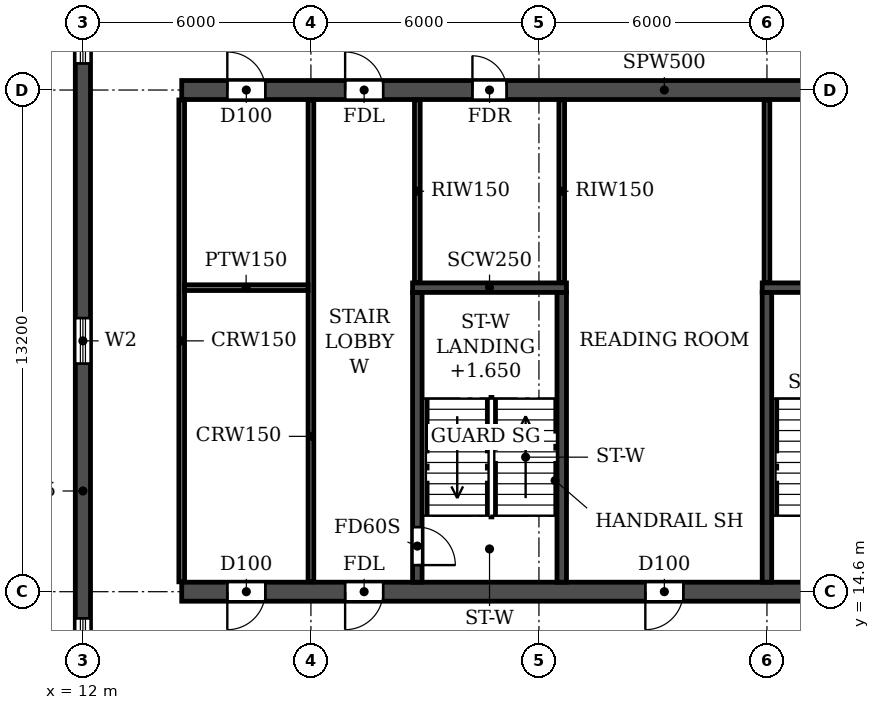
"""IFC4 building model, lengths in metres.
Left out: names, types, materials, properties, quantities, classifications, styles, units other than length and angle.
Written with IfcOpenShell. Run it as: python <this file> out.ifc"""

import sys

from ifc_helpers import new_model, si_unit, direction, frame, frame_2d, origin, place, context, subcontext, project, spatial, rectangle, extrude, element, fill, save


model = new_model("IFC4")
c1 = context("Model", 3, precision=1e-05, world=origin(), true_north=direction((0.0, 1.0)))
c2 = subcontext(c1, "Body", "Model", "MODEL_VIEW")
j1 = project(units=[si_unit("LENGTHUNIT", "METRE"), si_unit("PLANEANGLEUNIT", "RADIAN")], contexts=[c1])
p1 = place(None, origin())
s1 = spatial("IfcSite", under=j1, at=p1, CompositionType="ELEMENT")
p2 = place(p1, origin())
s2 = spatial("IfcBuilding", under=s1, at=p2, CompositionType="ELEMENT")
p3 = place(p2, frame((0.0, 0.0, 112.5)))
s3 = spatial("IfcBuildingStorey", under=s2, at=p3, CompositionType="ELEMENT", Elevation=112.5)
p4 = place(p3, frame((12.0, 4.683, 0.0), z_axis=(0.0, 0.0, 1.0), x_axis=(0.0, 1.0, 0.0)))
e1 = element("IfcWall", 1, at=p4, inside=s3, PredefinedType="SHEAR", context=c2, shape_type="SweptSolid", body=[
    extrude(rectangle(XDim=34.234, YDim=0.4, at=frame_2d((17.117, 0.0))), origin(), (0.0, 0.0, 1.0), 2.95),
])
p5 = place(p4, frame((23.817, 0.0, 0.9)))
e2 = element("IfcOpeningElement", 2, at=p5, cuts=e1, PredefinedType="OPENING", context=c2, shape_type="SweptSolid", body=[
    extrude(rectangle(XDim=1.2, YDim=1.5, at=frame_2d((0.6, 0.75))), frame((0.0, 0.21, 0.0), z_axis=(0.0, -1.0, 0.0), x_axis=(1.0, 0.0, 0.0)), (0.0, 0.0, 1.0), 0.42),
])
p6 = place(p4, frame((8.017, 0.0, 0.9)))
e3 = element("IfcOpeningElement", 3, at=p6, cuts=e1, PredefinedType="OPENING", context=c2, shape_type="SweptSolid", body=[
    extrude(rectangle(XDim=1.2, YDim=1.5, at=frame_2d((0.6, 0.75))), frame((0.0, 0.21, 0.0), z_axis=(0.0, -1.0, 0.0), x_axis=(1.0, 0.0, 0.0)), (0.0, 0.0, 1.0), 0.42),
])
p7 = place(p4, frame((15.917, 0.0, 0.9)))
e4 = element("IfcOpeningElement", 4, at=p7, cuts=e1, PredefinedType="OPENING", context=c2, shape_type="SweptSolid", body=[
    extrude(rectangle(XDim=1.2, YDim=1.5, at=frame_2d((0.6, 0.75))), frame((0.0, 0.21, 0.0), z_axis=(0.0, -1.0, 0.0), x_axis=(1.0, 0.0, 0.0)), (0.0, 0.0, 1.0), 0.42),
])
p8 = place(p4, frame((28.894, 0.0, 0.6)))
e5 = element("IfcOpeningElement", 5, at=p8, cuts=e1, PredefinedType="OPENING", context=c2, shape_type="SweptSolid", body=[
    extrude(rectangle(XDim=2.2, YDim=1.8, at=frame_2d((1.1, 0.9))), frame((0.0, 0.21, 0.0), z_axis=(0.0, -1.0, 0.0), x_axis=(1.0, 0.0, 0.0)), (0.0, 0.0, 1.0), 0.42),
])
p9 = place(p4, frame((2.541, 0.0, 0.6)))
e6 = element("IfcOpeningElement", 6, at=p9, cuts=e1, PredefinedType="OPENING", context=c2, shape_type="SweptSolid", body=[
    extrude(rectangle(XDim=2.2, YDim=1.8, at=frame_2d((1.1, 0.9))), frame((0.0, 0.21, 0.0), z_axis=(0.0, -1.0, 0.0), x_axis=(1.0, 0.0, 0.0)), (0.0, 0.0, 1.0), 0.42),
])
p10 = place(p3, frame((14.6, 14.6, 0.0), z_axis=(0.0, 0.0, 1.0), x_axis=(1.0, 0.0, 0.0)))
e7 = element("IfcWall", 7, at=p10, inside=s3, PredefinedType="SOLIDWALL", context=c2, shape_type="SweptSolid", body=[
    extrude(rectangle(XDim=72.8, YDim=0.5, at=frame_2d((36.4, 0.0))), origin(), (0.0, 0.0, 1.0), 2.95),
])
p11 = place(p10, frame((1.2, 0.0, 0.0)))
e8 = element("IfcOpeningElement", 8, at=p11, cuts=e7, PredefinedType="OPENING", context=c2, shape_type="SweptSolid", body=[
    extrude(rectangle(XDim=1.0, YDim=2.1, at=frame_2d((0.5, 1.05))), frame((0.0, 0.26, 0.0), z_axis=(0.0, -1.0, 0.0), x_axis=(1.0, 0.0, 0.0)), (0.0, 0.0, 1.0), 0.52),
])
p12 = place(p10, frame((4.3, 0.0, 0.0)))
e9 = element("IfcOpeningElement", 9, at=p12, cuts=e7, PredefinedType="OPENING", context=c2, shape_type="SweptSolid", body=[
    extrude(rectangle(XDim=1.0, YDim=2.1, at=frame_2d((0.5, 1.05))), frame((0.0, 0.26, 0.0), z_axis=(0.0, -1.0, 0.0), x_axis=(1.0, 0.0, 0.0)), (0.0, 0.0, 1.0), 0.52),
])
p13 = place(p10, frame((12.2, 0.0, 0.0)))
e10 = element("IfcOpeningElement", 10, at=p13, cuts=e7, PredefinedType="OPENING", context=c2, shape_type="SweptSolid", body=[
    extrude(rectangle(XDim=1.0, YDim=2.1, at=frame_2d((0.5, 1.05))), frame((0.0, 0.26, 0.0), z_axis=(0.0, -1.0, 0.0), x_axis=(1.0, 0.0, 0.0)), (0.0, 0.0, 1.0), 0.52),
])
p14 = place(p10, frame((16.8, 0.0, 0.0)))
e11 = element("IfcOpeningElement", 11, at=p14, cuts=e7, PredefinedType="OPENING", context=c2, shape_type="SweptSolid", body=[
    extrude(rectangle(XDim=1.0, YDim=2.1, at=frame_2d((0.5, 1.05))), frame((0.0, 0.26, 0.0), z_axis=(0.0, -1.0, 0.0), x_axis=(1.0, 0.0, 0.0)), (0.0, 0.0, 1.0), 0.52),
])
p15 = place(p10, frame((28.1, 0.0, 0.0)))
e12 = element("IfcOpeningElement", 12, at=p15, cuts=e7, PredefinedType="OPENING", context=c2, shape_type="SweptSolid", body=[
    extrude(rectangle(XDim=1.0, YDim=2.1, at=frame_2d((0.5, 1.05))), frame((0.0, 0.26, 0.0), z_axis=(0.0, -1.0, 0.0), x_axis=(1.0, 0.0, 0.0)), (0.0, 0.0, 1.0), 0.52),
])
p16 = place(p10, frame((32.0, 0.0, 0.0)))
e13 = element("IfcOpeningElement", 13, at=p16, cuts=e7, PredefinedType="OPENING", context=c2, shape_type="SweptSolid", body=[
    extrude(rectangle(XDim=1.0, YDim=2.1, at=frame_2d((0.5, 1.05))), frame((0.0, 0.26, 0.0), z_axis=(0.0, -1.0, 0.0), x_axis=(1.0, 0.0, 0.0)), (0.0, 0.0, 1.0), 0.52),
])
p17 = place(p10, frame((35.9, 0.0, 0.0)))
e14 = element("IfcOpeningElement", 14, at=p17, cuts=e7, PredefinedType="OPENING", context=c2, shape_type="SweptSolid", body=[
    extrude(rectangle(XDim=1.0, YDim=2.1, at=frame_2d((0.5, 1.05))), frame((0.0, 0.26, 0.0), z_axis=(0.0, -1.0, 0.0), x_axis=(1.0, 0.0, 0.0)), (0.0, 0.0, 1.0), 0.52),
])
p18 = place(p10, frame((39.8, 0.0, 0.0)))
e15 = element("IfcOpeningElement", 15, at=p18, cuts=e7, PredefinedType="OPENING", context=c2, shape_type="SweptSolid", body=[
    extrude(rectangle(XDim=1.0, YDim=2.1, at=frame_2d((0.5, 1.05))), frame((0.0, 0.26, 0.0), z_axis=(0.0, -1.0, 0.0), x_axis=(1.0, 0.0, 0.0)), (0.0, 0.0, 1.0), 0.52),
])
p19 = place(p10, frame((43.7, 0.0, 0.0)))
e16 = element("IfcOpeningElement", 16, at=p19, cuts=e7, PredefinedType="OPENING", context=c2, shape_type="SweptSolid", body=[
    extrude(rectangle(XDim=1.0, YDim=2.1, at=frame_2d((0.5, 1.05))), frame((0.0, 0.26, 0.0), z_axis=(0.0, -1.0, 0.0), x_axis=(1.0, 0.0, 0.0)), (0.0, 0.0, 1.0), 0.52),
])
p20 = place(p10, frame((55.0, 0.0, 0.0)))
e17 = element("IfcOpeningElement", 17, at=p20, cuts=e7, PredefinedType="OPENING", context=c2, shape_type="SweptSolid", body=[
    extrude(rectangle(XDim=1.0, YDim=2.1, at=frame_2d((0.5, 1.05))), frame((0.0, 0.26, 0.0), z_axis=(0.0, -1.0, 0.0), x_axis=(1.0, 0.0, 0.0)), (0.0, 0.0, 1.0), 0.52),
])
p21 = place(p10, frame((59.6, 0.0, 0.0)))
e18 = element("IfcOpeningElement", 18, at=p21, cuts=e7, PredefinedType="OPENING", context=c2, shape_type="SweptSolid", body=[
    extrude(rectangle(XDim=1.0, YDim=2.1, at=frame_2d((0.5, 1.05))), frame((0.0, 0.26, 0.0), z_axis=(0.0, -1.0, 0.0), x_axis=(1.0, 0.0, 0.0)), (0.0, 0.0, 1.0), 0.52),
])
p22 = place(p10, frame((67.5, 0.0, 0.0)))
e19 = element("IfcOpeningElement", 19, at=p22, cuts=e7, PredefinedType="OPENING", context=c2, shape_type="SweptSolid", body=[
    extrude(rectangle(XDim=1.0, YDim=2.1, at=frame_2d((0.5, 1.05))), frame((0.0, 0.26, 0.0), z_axis=(0.0, -1.0, 0.0), x_axis=(1.0, 0.0, 0.0)), (0.0, 0.0, 1.0), 0.52),
])
p23 = place(p10, frame((70.35, 0.0, 0.0)))
e20 = element("IfcOpeningElement", 20, at=p23, cuts=e7, PredefinedType="OPENING", context=c2, shape_type="SweptSolid", body=[
    extrude(rectangle(XDim=1.5, YDim=2.1, at=frame_2d((0.75, 1.05))), frame((0.0, 0.26, 0.0), z_axis=(0.0, -1.0, 0.0), x_axis=(1.0, 0.0, 0.0)), (0.0, 0.0, 1.0), 0.52),
])
p24 = place(p3, frame((14.6, 27.8, 0.0), z_axis=(0.0, 0.0, 1.0), x_axis=(1.0, 0.0, 0.0)))
e21 = element("IfcWall", 21, at=p24, inside=s3, PredefinedType="SOLIDWALL", context=c2, shape_type="SweptSolid", body=[
    extrude(rectangle(XDim=72.8, YDim=0.5, at=frame_2d((36.4, 0.0))), origin(), (0.0, 0.0, 1.0), 2.95),
])
p25 = place(p24, frame((1.2, 0.0, 0.0)))
e22 = element("IfcOpeningElement", 22, at=p25, cuts=e21, PredefinedType="OPENING", context=c2, shape_type="SweptSolid", body=[
    extrude(rectangle(XDim=1.0, YDim=2.1, at=frame_2d((0.5, 1.05))), frame((0.0, 0.26, 0.0), z_axis=(0.0, -1.0, 0.0), x_axis=(1.0, 0.0, 0.0)), (0.0, 0.0, 1.0), 0.52),
])
p26 = place(p24, frame((4.3, 0.0, 0.0)))
e23 = element("IfcOpeningElement", 23, at=p26, cuts=e21, PredefinedType="OPENING", context=c2, shape_type="SweptSolid", body=[
    extrude(rectangle(XDim=1.0, YDim=2.1, at=frame_2d((0.5, 1.05))), frame((0.0, 0.26, 0.0), z_axis=(0.0, -1.0, 0.0), x_axis=(1.0, 0.0, 0.0)), (0.0, 0.0, 1.0), 0.52),
])
p27 = place(p24, frame((7.65, 0.0, 0.0)))
e24 = element("IfcOpeningElement", 24, at=p27, cuts=e21, PredefinedType="OPENING", context=c2, shape_type="SweptSolid", body=[
    extrude(rectangle(XDim=0.9, YDim=2.1, at=frame_2d((0.45, 1.05))), frame((0.0, 0.26, 0.0), z_axis=(0.0, -1.0, 0.0), x_axis=(1.0, 0.0, 0.0)), (0.0, 0.0, 1.0), 0.52),
])
p28 = place(p24, frame((16.85, 0.0, 0.0)))
e25 = element("IfcOpeningElement", 25, at=p28, cuts=e21, PredefinedType="OPENING", context=c2, shape_type="SweptSolid", body=[
    extrude(rectangle(XDim=0.9, YDim=2.1, at=frame_2d((0.45, 1.05))), frame((0.0, 0.26, 0.0), z_axis=(0.0, -1.0, 0.0), x_axis=(1.0, 0.0, 0.0)), (0.0, 0.0, 1.0), 0.52),
])
p29 = place(p24, frame((20.0, 0.0, 0.0)))
e26 = element("IfcOpeningElement", 26, at=p29, cuts=e21, PredefinedType="OPENING", context=c2, shape_type="SweptSolid", body=[
    extrude(rectangle(XDim=1.0, YDim=2.1, at=frame_2d((0.5, 1.05))), frame((0.0, 0.26, 0.0), z_axis=(0.0, -1.0, 0.0), x_axis=(1.0, 0.0, 0.0)), (0.0, 0.0, 1.0), 0.52),
])
p30 = place(p24, frame((25.2, 0.0, 0.0)))
e27 = element("IfcOpeningElement", 27, at=p30, cuts=e21, PredefinedType="OPENING", context=c2, shape_type="SweptSolid", body=[
    extrude(rectangle(XDim=1.0, YDim=2.1, at=frame_2d((0.5, 1.05))), frame((0.0, 0.26, 0.0), z_axis=(0.0, -1.0, 0.0), x_axis=(1.0, 0.0, 0.0)), (0.0, 0.0, 1.0), 0.52),
])
p31 = place(p24, frame((33.0, 0.0, 0.0)))
e28 = element("IfcOpeningElement", 28, at=p31, cuts=e21, PredefinedType="OPENING", context=c2, shape_type="SweptSolid", body=[
    extrude(rectangle(XDim=1.0, YDim=2.1, at=frame_2d((0.5, 1.05))), frame((0.0, 0.26, 0.0), z_axis=(0.0, -1.0, 0.0), x_axis=(1.0, 0.0, 0.0)), (0.0, 0.0, 1.0), 0.52),
])
p32 = place(p24, frame((35.9, 0.0, 0.0)))
e29 = element("IfcOpeningElement", 29, at=p32, cuts=e21, PredefinedType="OPENING", context=c2, shape_type="SweptSolid", body=[
    extrude(rectangle(XDim=1.0, YDim=2.1, at=frame_2d((0.5, 1.05))), frame((0.0, 0.26, 0.0), z_axis=(0.0, -1.0, 0.0), x_axis=(1.0, 0.0, 0.0)), (0.0, 0.0, 1.0), 0.52),
])
p33 = place(p24, frame((38.8, 0.0, 0.0)))
e30 = element("IfcOpeningElement", 30, at=p33, cuts=e21, PredefinedType="OPENING", context=c2, shape_type="SweptSolid", body=[
    extrude(rectangle(XDim=1.0, YDim=2.1, at=frame_2d((0.5, 1.05))), frame((0.0, 0.26, 0.0), z_axis=(0.0, -1.0, 0.0), x_axis=(1.0, 0.0, 0.0)), (0.0, 0.0, 1.0), 0.52),
])
p34 = place(p24, frame((44.0, 0.0, 0.0)))
e31 = element("IfcOpeningElement", 31, at=p34, cuts=e21, PredefinedType="OPENING", context=c2, shape_type="SweptSolid", body=[
    extrude(rectangle(XDim=1.0, YDim=2.1, at=frame_2d((0.5, 1.05))), frame((0.0, 0.26, 0.0), z_axis=(0.0, -1.0, 0.0), x_axis=(1.0, 0.0, 0.0)), (0.0, 0.0, 1.0), 0.52),
])
p35 = place(p24, frame((49.2, 0.0, 0.0)))
e32 = element("IfcOpeningElement", 32, at=p35, cuts=e21, PredefinedType="OPENING", context=c2, shape_type="SweptSolid", body=[
    extrude(rectangle(XDim=1.0, YDim=2.1, at=frame_2d((0.5, 1.05))), frame((0.0, 0.26, 0.0), z_axis=(0.0, -1.0, 0.0), x_axis=(1.0, 0.0, 0.0)), (0.0, 0.0, 1.0), 0.52),
])
p36 = place(p24, frame((51.8, 0.0, 0.0)))
e33 = element("IfcOpeningElement", 33, at=p36, cuts=e21, PredefinedType="OPENING", context=c2, shape_type="SweptSolid", body=[
    extrude(rectangle(XDim=1.0, YDim=2.1, at=frame_2d((0.5, 1.05))), frame((0.0, 0.26, 0.0), z_axis=(0.0, -1.0, 0.0), x_axis=(1.0, 0.0, 0.0)), (0.0, 0.0, 1.0), 0.52),
])
p37 = place(p24, frame((55.05, 0.0, 0.0)))
e34 = element("IfcOpeningElement", 34, at=p37, cuts=e21, PredefinedType="OPENING", context=c2, shape_type="SweptSolid", body=[
    extrude(rectangle(XDim=0.9, YDim=2.1, at=frame_2d((0.45, 1.05))), frame((0.0, 0.26, 0.0), z_axis=(0.0, -1.0, 0.0), x_axis=(1.0, 0.0, 0.0)), (0.0, 0.0, 1.0), 0.52),
])
p38 = place(p24, frame((64.25, 0.0, 0.0)))
e35 = element("IfcOpeningElement", 35, at=p38, cuts=e21, PredefinedType="OPENING", context=c2, shape_type="SweptSolid", body=[
    extrude(rectangle(XDim=0.9, YDim=2.1, at=frame_2d((0.45, 1.05))), frame((0.0, 0.26, 0.0), z_axis=(0.0, -1.0, 0.0), x_axis=(1.0, 0.0, 0.0)), (0.0, 0.0, 1.0), 0.52),
])
p39 = place(p24, frame((67.5, 0.0, 0.0)))
e36 = element("IfcOpeningElement", 36, at=p39, cuts=e21, PredefinedType="OPENING", context=c2, shape_type="SweptSolid", body=[
    extrude(rectangle(XDim=1.0, YDim=2.1, at=frame_2d((0.5, 1.05))), frame((0.0, 0.26, 0.0), z_axis=(0.0, -1.0, 0.0), x_axis=(1.0, 0.0, 0.0)), (0.0, 0.0, 1.0), 0.52),
])
p40 = place(p24, frame((70.6, 0.0, 0.0)))
e37 = element("IfcOpeningElement", 37, at=p40, cuts=e21, PredefinedType="OPENING", context=c2, shape_type="SweptSolid", body=[
    extrude(rectangle(XDim=1.0, YDim=2.1, at=frame_2d((0.5, 1.05))), frame((0.0, 0.26, 0.0), z_axis=(0.0, -1.0, 0.0), x_axis=(1.0, 0.0, 0.0)), (0.0, 0.0, 1.0), 0.52),
])
p41 = place(p3, frame((30.0, 14.85, 0.0), z_axis=(0.0, 0.0, 1.0), x_axis=(0.0, 1.0, 0.0)))
e38 = element("IfcWall", 38, at=p41, inside=s3, PredefinedType="SOLIDWALL", context=c2, shape_type="SweptSolid", body=[
    extrude(rectangle(XDim=7.625, YDim=0.25, at=frame_2d((3.812, 0.0))), origin(), (0.0, 0.0, 1.0), 2.95),
])
p42 = place(p3, frame((29.875, 22.6, 0.0), z_axis=(0.0, 0.0, 1.0), x_axis=(1.0, 0.0, 0.0)))
e39 = element("IfcWall", 39, at=p42, inside=s3, PredefinedType="SOLIDWALL", context=c2, shape_type="SweptSolid", body=[
    extrude(rectangle(XDim=4.05, YDim=0.25, at=frame_2d((2.025, 0.0))), origin(), (0.0, 0.0, 1.0), 2.95),
])
p43 = place(p3, frame((20.8, 14.85, 0.0), z_axis=(0.0, 0.0, 1.0), x_axis=(0.0, 1.0, 0.0)))
e40 = element("IfcWall", 40, at=p43, inside=s3, PredefinedType="SOLIDWALL", context=c2, shape_type="SweptSolid", body=[
    extrude(rectangle(XDim=7.625, YDim=0.25, at=frame_2d((3.812, 0.0))), origin(), (0.0, 0.0, 1.0), 2.95),
])
p44 = place(p43, frame((0.45, 0.0, 0.0)))
e41 = element("IfcOpeningElement", 41, at=p44, cuts=e40, PredefinedType="OPENING", context=c2, shape_type="SweptSolid", body=[
    extrude(rectangle(XDim=1.0, YDim=2.1, at=frame_2d((0.5, 1.05))), frame((0.0, 0.135, 0.0), z_axis=(0.0, -1.0, 0.0), x_axis=(1.0, 0.0, 0.0)), (0.0, 0.0, 1.0), 0.27),
])
p45 = place(p3, frame((24.6, 14.85, 0.0), z_axis=(0.0, 0.0, 1.0), x_axis=(0.0, 1.0, 0.0)))
e42 = element("IfcWall", 42, at=p45, inside=s3, PredefinedType="SOLIDWALL", context=c2, shape_type="SweptSolid", body=[
    extrude(rectangle(XDim=7.625, YDim=0.25, at=frame_2d((3.812, 0.0))), origin(), (0.0, 0.0, 1.0), 2.95),
])
p46 = place(p3, frame((20.675, 22.6, 0.0), z_axis=(0.0, 0.0, 1.0), x_axis=(1.0, 0.0, 0.0)))
e43 = element("IfcWall", 43, at=p46, inside=s3, PredefinedType="SOLIDWALL", context=c2, shape_type="SweptSolid", body=[
    extrude(rectangle(XDim=4.05, YDim=0.25, at=frame_2d((2.025, 0.0))), origin(), (0.0, 0.0, 1.0), 2.95),
])
for number, where, z_axis, x_axis in (
    (44, (14.6, 14.86, 0.0), (0.0, 0.0, 1.0), (0.0, 1.0, 0.0)),
    (45, (18.0, 14.86, 0.0), (0.0, 0.0, 1.0), (0.0, 1.0, 0.0)),
):
    element("IfcWall", number, at=place(p3, frame(where, z_axis=z_axis, x_axis=x_axis)), inside=s3, PredefinedType="PARTITIONING", context=c2, shape_type="SweptSolid", body=[
        extrude(rectangle(XDim=12.68, YDim=0.15, at=frame_2d((6.34, 0.0))), origin(), (0.0, 0.0, 1.0), 2.95),
    ])
p47 = place(p3, frame((14.675, 22.6, 0.0), z_axis=(0.0, 0.0, 1.0), x_axis=(1.0, 0.0, 0.0)))
e46 = element("IfcWall", 46, at=p47, inside=s3, PredefinedType="PARTITIONING", context=c2, shape_type="SweptSolid", body=[
    extrude(rectangle(XDim=3.25, YDim=0.15, at=frame_2d((1.625, 0.0))), origin(), (0.0, 0.0, 1.0), 2.95),
])
for number, where, z_axis, x_axis in (
    (47, (20.8, 22.735, 0.0), (0.0, 0.0, 1.0), (0.0, 1.0, 0.0)),
    (48, (24.6, 22.735, 0.0), (0.0, 0.0, 1.0), (0.0, 1.0, 0.0)),
    (49, (30.0, 22.735, 0.0), (0.0, 0.0, 1.0), (0.0, 1.0, 0.0)),
):
    element("IfcWall", number, at=place(p3, frame(where, z_axis=z_axis, x_axis=x_axis)), inside=s3, PredefinedType="PARTITIONING", context=c2, shape_type="SweptSolid", body=[
        extrude(rectangle(XDim=4.805, YDim=0.15, at=frame_2d((2.402, 0.0))), origin(), (0.0, 0.0, 1.0), 2.95),
    ])
p48 = place(p5, origin())
e50 = element("IfcWindow", 50, at=p48, inside=s3, PartitioningType="SINGLE_PANEL", PredefinedType="WINDOW", context=c2, shape_type="SweptSolid", body=[
    extrude(rectangle(XDim=1.2, YDim=1.5, at=frame_2d((0.6, 0.75))), frame((0.0, 0.03, 0.0), z_axis=(0.0, -1.0, 0.0), x_axis=(1.0, 0.0, 0.0)), (0.0, 0.0, 1.0), 0.06),
])
fill(e2, e50)
p49 = place(p6, origin())
e51 = element("IfcWindow", 51, at=p49, inside=s3, PartitioningType="SINGLE_PANEL", PredefinedType="WINDOW", context=c2, shape_type="SweptSolid", body=[
    extrude(rectangle(XDim=1.2, YDim=1.5, at=frame_2d((0.6, 0.75))), frame((0.0, 0.03, 0.0), z_axis=(0.0, -1.0, 0.0), x_axis=(1.0, 0.0, 0.0)), (0.0, 0.0, 1.0), 0.06),
])
fill(e3, e51)
p50 = place(p7, origin())
e52 = element("IfcWindow", 52, at=p50, inside=s3, PartitioningType="SINGLE_PANEL", PredefinedType="WINDOW", context=c2, shape_type="SweptSolid", body=[
    extrude(rectangle(XDim=1.2, YDim=1.5, at=frame_2d((0.6, 0.75))), frame((0.0, 0.03, 0.0), z_axis=(0.0, -1.0, 0.0), x_axis=(1.0, 0.0, 0.0)), (0.0, 0.0, 1.0), 0.06),
])
fill(e4, e52)
p51 = place(p25, origin())
e53 = element("IfcDoor", 53, at=p51, inside=s3, OperationType="SINGLE_SWING_LEFT", PredefinedType="DOOR", context=c2, shape_type="SweptSolid", body=[
    extrude(rectangle(XDim=1.0, YDim=2.1, at=frame_2d((0.5, 1.05))), frame((0.0, 0.025, 0.0), z_axis=(0.0, -1.0, 0.0), x_axis=(1.0, 0.0, 0.0)), (0.0, 0.0, 1.0), 0.05),
])
fill(e22, e53)
p52 = place(p26, origin())
e54 = element("IfcDoor", 54, at=p52, inside=s3, OperationType="SINGLE_SWING_LEFT", PredefinedType="DOOR", context=c2, shape_type="SweptSolid", body=[
    extrude(rectangle(XDim=1.0, YDim=2.1, at=frame_2d((0.5, 1.05))), frame((0.0, 0.025, 0.0), z_axis=(0.0, -1.0, 0.0), x_axis=(1.0, 0.0, 0.0)), (0.0, 0.0, 1.0), 0.05),
])
fill(e23, e54)
p53 = place(p27, origin())
e55 = element("IfcDoor", 55, at=p53, inside=s3, OperationType="SINGLE_SWING_LEFT", PredefinedType="DOOR", context=c2, shape_type="SweptSolid", body=[
    extrude(rectangle(XDim=0.9, YDim=2.1, at=frame_2d((0.45, 1.05))), frame((0.0, 0.025, 0.0), z_axis=(0.0, -1.0, 0.0), x_axis=(1.0, 0.0, 0.0)), (0.0, 0.0, 1.0), 0.05),
])
fill(e24, e55)
p54 = place(p11, frame((1.0, 0.0, 0.0), z_axis=(0.0, 0.0, 1.0), x_axis=(-1.0, 0.0, 0.0)))
e56 = element("IfcDoor", 56, at=p54, inside=s3, OperationType="SINGLE_SWING_RIGHT", PredefinedType="DOOR", context=c2, shape_type="SweptSolid", body=[
    extrude(rectangle(XDim=1.0, YDim=2.1, at=frame_2d((0.5, 1.05))), frame((0.0, 0.025, 0.0), z_axis=(0.0, -1.0, 0.0), x_axis=(1.0, 0.0, 0.0)), (0.0, 0.0, 1.0), 0.05),
])
fill(e8, e56)
p55 = place(p12, frame((1.0, 0.0, 0.0), z_axis=(0.0, 0.0, 1.0), x_axis=(-1.0, 0.0, 0.0)))
e57 = element("IfcDoor", 57, at=p55, inside=s3, OperationType="SINGLE_SWING_RIGHT", PredefinedType="DOOR", context=c2, shape_type="SweptSolid", body=[
    extrude(rectangle(XDim=1.0, YDim=2.1, at=frame_2d((0.5, 1.05))), frame((0.0, 0.025, 0.0), z_axis=(0.0, -1.0, 0.0), x_axis=(1.0, 0.0, 0.0)), (0.0, 0.0, 1.0), 0.05),
])
fill(e9, e57)
p56 = place(p13, frame((1.0, 0.0, 0.0), z_axis=(0.0, 0.0, 1.0), x_axis=(-1.0, 0.0, 0.0)))
e58 = element("IfcDoor", 58, at=p56, inside=s3, OperationType="SINGLE_SWING_RIGHT", PredefinedType="DOOR", context=c2, shape_type="SweptSolid", body=[
    extrude(rectangle(XDim=1.0, YDim=2.1, at=frame_2d((0.5, 1.05))), frame((0.0, 0.025, 0.0), z_axis=(0.0, -1.0, 0.0), x_axis=(1.0, 0.0, 0.0)), (0.0, 0.0, 1.0), 0.05),
])
fill(e10, e58)
p57 = place(p44, frame((1.0, 0.0, 0.0), z_axis=(0.0, 0.0, 1.0), x_axis=(-1.0, 0.0, 0.0)))
e59 = element("IfcDoor", 59, at=p57, inside=s3, OperationType="SINGLE_SWING_RIGHT", PredefinedType="DOOR", context=c2, shape_type="SweptSolid", body=[
    extrude(rectangle(XDim=1.0, YDim=2.1, at=frame_2d((0.5, 1.05))), frame((0.0, 0.025, 0.0), z_axis=(0.0, -1.0, 0.0), x_axis=(1.0, 0.0, 0.0)), (0.0, 0.0, 1.0), 0.05),
])
fill(e41, e59)
save(model, sys.argv[1])
